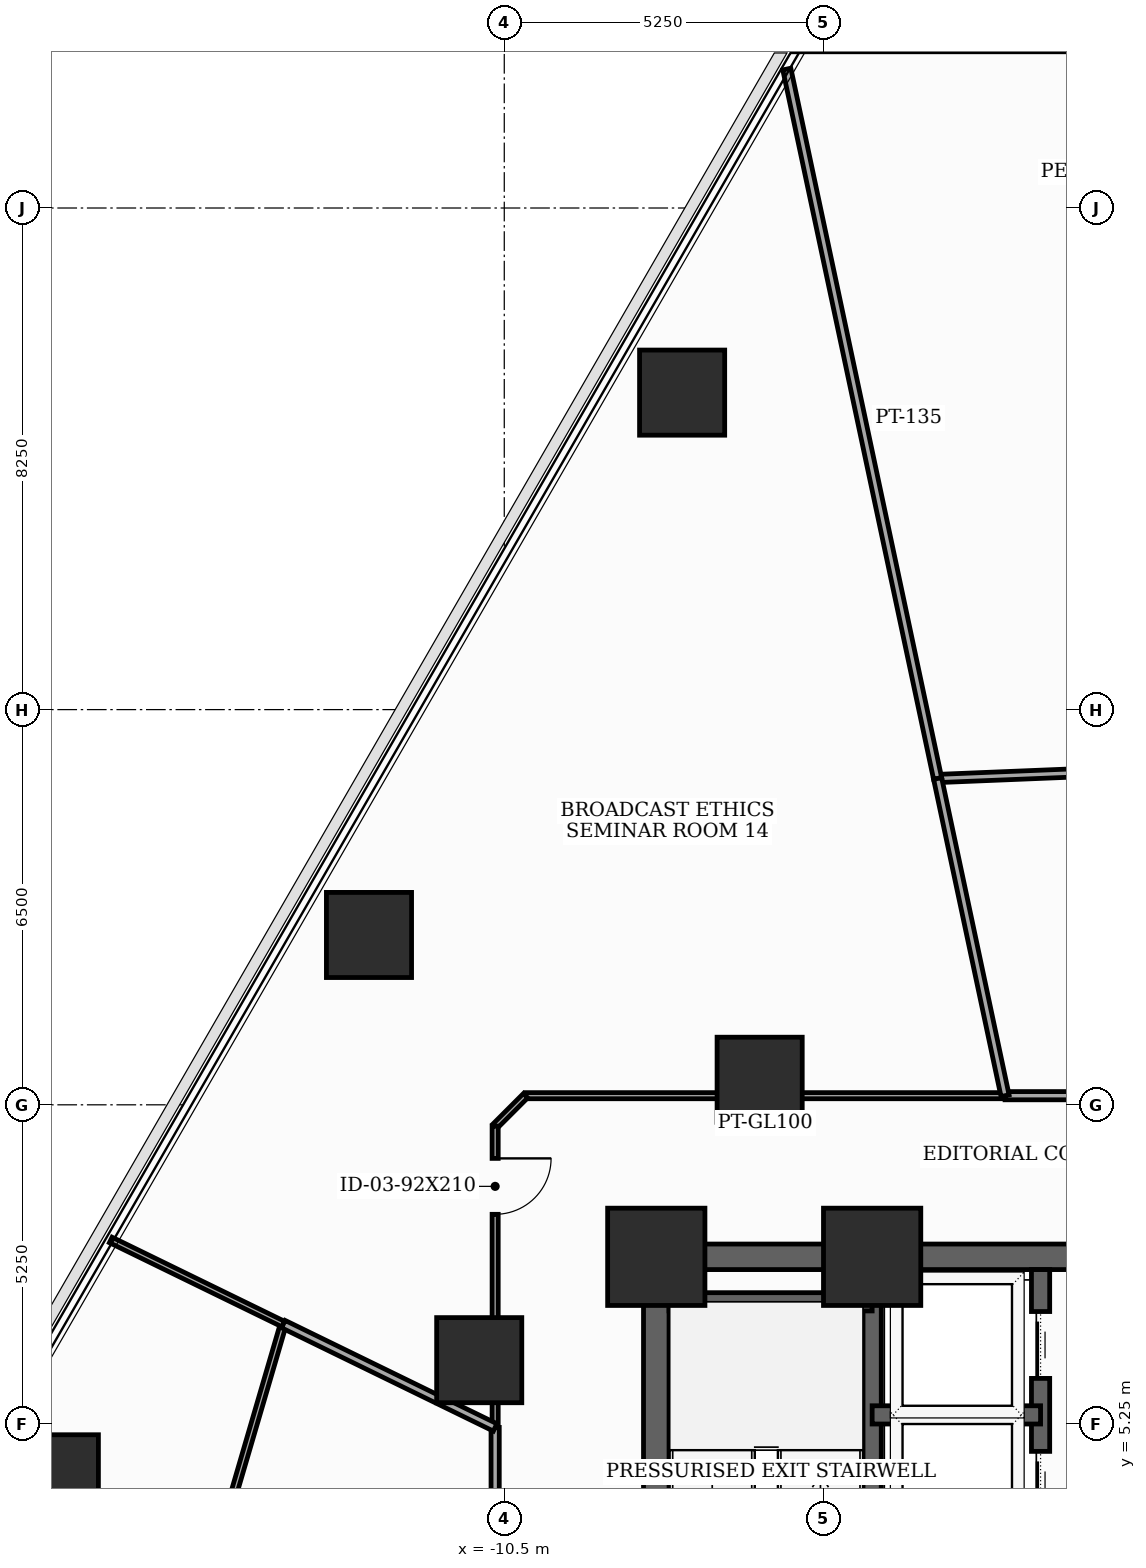
"""IFC4 building model, lengths in metres.
Left out: names, types, materials, properties, quantities, classifications, styles, units other than length and angle.
Written with IfcOpenShell. Run it as: python <this file> out.ifc"""

import sys

from ifc_helpers import new_model, si_unit, direction, frame, frame_2d, origin, origin_2d, place, context, subcontext, project, spatial, rectangle, extrude, element, fill, save


model = new_model("IFC4")
c1 = context("Model", 3, precision=1e-05, world=origin(), true_north=direction((0.0, 1.0)))
c2 = subcontext(c1, "Body", "Model", "MODEL_VIEW")
j1 = project(units=[si_unit("LENGTHUNIT", "METRE"), si_unit("PLANEANGLEUNIT", "RADIAN")], contexts=[c1])
p1 = place(None, origin())
s1 = spatial("IfcSite", under=j1, at=p1, CompositionType="ELEMENT")
p2 = place(p1, origin())
s2 = spatial("IfcBuilding", under=s1, at=p2, CompositionType="ELEMENT")
p3 = place(p2, frame((0.0, 0.0, 48.2)))
s3 = spatial("IfcBuildingStorey", under=s2, at=p3, CompositionType="ELEMENT", Elevation=48.2)
for number, where, z_axis, x_axis in (
    (1, (-4.45, 8.0, 0.0), (0.0, 0.0, 1.0), (1.0, 0.0, 0.0)),
    (2, (-8.0, 8.0, 0.0), (0.0, 0.0, 1.0), (1.0, 0.0, 0.0)),
):
    element("IfcColumn", number, at=place(p3, frame(where, z_axis=z_axis, x_axis=x_axis)), inside=s3, PredefinedType="COLUMN", context=c2, shape_type="SweptSolid", body=[
        extrude(rectangle(XDim=1.6, YDim=1.6, at=origin_2d()), origin(), (0.0, 0.0, 1.0), 3.7),
    ])
for number, where, z_axis, x_axis in (
    (3, (-6.3, 10.912, 0.0), (0.0, 0.0, 1.0), (1.0, 0.0, 0.0)),
    (4, (-10.912, 6.3, 0.0), (0.0, 0.0, 1.0), (1.0, 0.0, 0.0)),
    (5, (-7.575, 22.213, 0.0), (0.0, 0.0, 1.0), (1.0, 0.0, 0.0)),
    (6, (-12.725, 13.293, 0.0), (0.0, 0.0, 1.0), (1.0, 0.0, 0.0)),
    (7, (-17.875, 4.373, 0.0), (0.0, 0.0, 1.0), (1.0, 0.0, 0.0)),
):
    element("IfcColumn", number, at=place(p3, frame(where, z_axis=z_axis, x_axis=x_axis)), inside=s3, PredefinedType="COLUMN", context=c2, shape_type="SweptSolid", body=[
        extrude(rectangle(XDim=1.4, YDim=1.4, at=origin_2d()), origin(), (0.0, 0.0, 1.0), 3.7),
    ])
p4 = place(p3, frame((-8.0, -8.0, 0.0), z_axis=(0.0, 0.0, 1.0), x_axis=(0.0, 1.0, 0.0)))
e8 = element("IfcWall", 8, at=p4, inside=s3, PredefinedType="SHEAR", context=c2, shape_type="SweptSolid", body=[
    extrude(rectangle(XDim=16.0, YDim=0.42, at=frame_2d((8.0, 0.0))), origin(), (0.0, 0.0, 1.0), 3.5),
])
p5 = place(p4, frame((1.002, 0.0, 0.0)))
e9 = element("IfcOpeningElement", 9, at=p5, cuts=e8, PredefinedType="OPENING", context=c2, shape_type="SweptSolid", body=[
    extrude(rectangle(XDim=0.85, YDim=2.02, at=frame_2d((0.425, 1.01))), frame((0.0, 0.22, 0.0), z_axis=(0.0, -1.0, 0.0), x_axis=(1.0, 0.0, 0.0)), (0.0, 0.0, 1.0), 0.44),
])
p6 = place(p4, frame((5.35, 0.0, 0.0)))
e10 = element("IfcOpeningElement", 10, at=p6, cuts=e8, PredefinedType="OPENING", context=c2, shape_type="SweptSolid", body=[
    extrude(rectangle(XDim=1.05, YDim=2.15, at=frame_2d((0.525, 1.075))), frame((0.0, 0.22, 0.0), z_axis=(0.0, -1.0, 0.0), x_axis=(1.0, 0.0, 0.0)), (0.0, 0.0, 1.0), 0.44),
])
p7 = place(p3, frame((-8.0, 8.0, 0.0), z_axis=(0.0, 0.0, 1.0), x_axis=(1.0, 0.0, 0.0)))
e11 = element("IfcWall", 11, at=p7, inside=s3, PredefinedType="SHEAR", context=c2, shape_type="SweptSolid", body=[
    extrude(rectangle(XDim=16.0, YDim=0.42, at=frame_2d((8.0, 0.0))), origin(), (0.0, 0.0, 1.0), 3.5),
])
p8 = place(p7, frame((7.1, 0.0, 0.0)))
e12 = element("IfcOpeningElement", 12, at=p8, cuts=e11, PredefinedType="OPENING", context=c2, shape_type="SweptSolid", body=[
    extrude(rectangle(XDim=1.8, YDim=2.15, at=frame_2d((0.9, 1.075))), frame((0.0, 0.22, 0.0), z_axis=(0.0, -1.0, 0.0), x_axis=(1.0, 0.0, 0.0)), (0.0, 0.0, 1.0), 0.44),
])
p9 = place(p3, frame((-4.45, -7.79, 0.0), z_axis=(0.0, 0.0, 1.0), x_axis=(0.0, 1.0, 0.0)))
e13 = element("IfcWall", 13, at=p9, inside=s3, PredefinedType="SHEAR", context=c2, shape_type="SweptSolid", body=[
    extrude(rectangle(XDim=15.58, YDim=0.3, at=frame_2d((7.79, 0.0))), origin(), (0.0, 0.0, 1.0), 3.5),
])
p10 = place(p3, frame((-7.79, 7.26, 0.0), z_axis=(0.0, 0.0, 1.0), x_axis=(1.0, 0.0, 0.0)))
e14 = element("IfcWall", 14, at=p10, inside=s3, PredefinedType="SHEAR", context=c2, shape_type="SweptSolid", body=[
    extrude(rectangle(XDim=3.34, YDim=0.3, at=frame_2d((1.67, 0.0))), origin(), (0.0, 0.0, 1.0), 3.5),
])
p11 = place(p3, frame((-1.68, -4.85, 0.0), z_axis=(0.0, 0.0, 1.0), x_axis=(0.0, 1.0, 0.0)))
e15 = element("IfcWall", 15, at=p11, inside=s3, PredefinedType="SHEAR", context=c2, shape_type="SweptSolid", body=[
    extrude(rectangle(XDim=12.64, YDim=0.3, at=frame_2d((6.32, 0.0))), origin(), (0.0, 0.0, 1.0), 3.5),
])
p12 = place(p11, frame((3.95, 0.0, 0.0)))
e16 = element("IfcOpeningElement", 16, at=p12, cuts=e15, PredefinedType="OPENING", context=c2, shape_type="SweptSolid", body=[
    extrude(rectangle(XDim=1.1, YDim=2.1, at=frame_2d((0.55, 1.05))), frame((0.0, 0.16, 0.0), z_axis=(0.0, -1.0, 0.0), x_axis=(1.0, 0.0, 0.0)), (0.0, 0.0, 1.0), 0.32),
])
p13 = place(p11, frame((6.25, 0.0, 0.0)))
e17 = element("IfcOpeningElement", 17, at=p13, cuts=e15, PredefinedType="OPENING", context=c2, shape_type="SweptSolid", body=[
    extrude(rectangle(XDim=1.1, YDim=2.1, at=frame_2d((0.55, 1.05))), frame((0.0, 0.16, 0.0), z_axis=(0.0, -1.0, 0.0), x_axis=(1.0, 0.0, 0.0)), (0.0, 0.0, 1.0), 0.32),
])
p14 = place(p11, frame((8.55, 0.0, 0.0)))
e18 = element("IfcOpeningElement", 18, at=p14, cuts=e15, PredefinedType="OPENING", context=c2, shape_type="SweptSolid", body=[
    extrude(rectangle(XDim=1.1, YDim=2.1, at=frame_2d((0.55, 1.05))), frame((0.0, 0.16, 0.0), z_axis=(0.0, -1.0, 0.0), x_axis=(1.0, 0.0, 0.0)), (0.0, 0.0, 1.0), 0.32),
])
p15 = place(p11, frame((10.85, 0.0, 0.0)))
e19 = element("IfcOpeningElement", 19, at=p15, cuts=e15, PredefinedType="OPENING", context=c2, shape_type="SweptSolid", body=[
    extrude(rectangle(XDim=1.1, YDim=2.1, at=frame_2d((0.55, 1.05))), frame((0.0, 0.16, 0.0), z_axis=(0.0, -1.0, 0.0), x_axis=(1.0, 0.0, 0.0)), (0.0, 0.0, 1.0), 0.32),
])
p16 = place(p11, frame((0.45, 0.0, 0.0)))
e20 = element("IfcOpeningElement", 20, at=p16, cuts=e15, PredefinedType="OPENING", context=c2, shape_type="SweptSolid", body=[
    extrude(rectangle(XDim=0.85, YDim=2.02, at=frame_2d((0.425, 1.01))), frame((0.0, 0.16, 0.0), z_axis=(0.0, -1.0, 0.0), x_axis=(1.0, 0.0, 0.0)), (0.0, 0.0, 1.0), 0.32),
])
p17 = place(p11, frame((2.05, 0.0, 0.0)))
e21 = element("IfcOpeningElement", 21, at=p17, cuts=e15, PredefinedType="OPENING", context=c2, shape_type="SweptSolid", body=[
    extrude(rectangle(XDim=0.85, YDim=2.02, at=frame_2d((0.425, 1.01))), frame((0.0, 0.16, 0.0), z_axis=(0.0, -1.0, 0.0), x_axis=(1.0, 0.0, 0.0)), (0.0, 0.0, 1.0), 0.32),
])
p18 = place(p3, frame((-4.45, 5.4, 0.0), z_axis=(0.0, 0.0, 1.0), x_axis=(1.0, 0.0, 0.0)))
e22 = element("IfcWall", 22, at=p18, inside=s3, PredefinedType="SHEAR", context=c2, shape_type="SweptSolid", body=[
    extrude(rectangle(XDim=2.77, YDim=0.3, at=frame_2d((1.385, 0.0))), origin(), (0.0, 0.0, 1.0), 3.5),
])
p19 = place(p3, frame((1.715, 10.65, 0.0), z_axis=(0.0, 0.0, 1.0), x_axis=(-1.0, 0.0, 0.0)))
e23 = element("IfcWall", 23, at=p19, inside=s3, PredefinedType="PARTITIONING", context=c2, shape_type="SweptSolid", body=[
    extrude(rectangle(XDim=3.979, YDim=0.135, at=frame_2d((1.99, 0.0))), origin(), (0.0, 0.0, 1.0), 2.785),
])
p20 = place(p3, frame((-10.65, 5.194, 0.0), z_axis=(0.0, 0.0, 1.0), x_axis=(0.0, -1.0, 0.0)))
e24 = element("IfcWall", 24, at=p20, inside=s3, PredefinedType="PARTITIONING", context=c2, shape_type="SweptSolid", body=[
    extrude(rectangle(XDim=6.909, YDim=0.135, at=frame_2d((3.455, 0.0))), origin(), (0.0, 0.0, 1.0), 2.785),
])
p21 = place(p20, frame((2.979, 0.0, 0.0)))
e25 = element("IfcOpeningElement", 25, at=p21, cuts=e24, PredefinedType="OPENING", context=c2, shape_type="SweptSolid", body=[
    extrude(rectangle(XDim=0.95, YDim=2.1, at=frame_2d((0.475, 1.05))), frame((0.0, 0.077, 0.0), z_axis=(0.0, -1.0, 0.0), x_axis=(1.0, 0.0, 0.0)), (0.0, 0.0, 1.0), 0.155),
])
p22 = place(p3, frame((-2.264, 10.65, 0.0), z_axis=(0.0, 0.0, 1.0), x_axis=(-1.0, 0.0, 0.0)))
e26 = element("IfcWall", 26, at=p22, inside=s3, PredefinedType="MOVABLE", context=c2, shape_type="SweptSolid", body=[
    extrude(rectangle(XDim=7.886, YDim=0.1, at=frame_2d((3.943, 0.0))), origin(), (0.0, 0.0, 1.0), 2.685),
])
p23 = place(p3, frame((-10.15, 10.65, 0.0), z_axis=(0.0, 0.0, 1.0), x_axis=(-0.707106781187, -0.707106781187, 0.0)))
e27 = element("IfcWall", 27, at=p23, inside=s3, PredefinedType="MOVABLE", context=c2, shape_type="SweptSolid", body=[
    extrude(rectangle(XDim=0.707, YDim=0.1, at=frame_2d((0.354, 0.0))), origin(), (0.0, 0.0, 1.0), 3.5),
])
p24 = place(p3, frame((-10.65, 10.15, 0.0), z_axis=(0.0, 0.0, 1.0), x_axis=(0.0, -1.0, 0.0)))
e28 = element("IfcWall", 28, at=p24, inside=s3, PredefinedType="MOVABLE", context=c2, shape_type="SweptSolid", body=[
    extrude(rectangle(XDim=4.956, YDim=0.1, at=frame_2d((2.478, 0.0))), origin(), (0.0, 0.0, 1.0), 2.785),
])
p25 = place(p24, frame((0.531, 0.0, 0.0)))
e29 = element("IfcOpeningElement", 29, at=p25, cuts=e28, PredefinedType="OPENING", context=c2, shape_type="SweptSolid", body=[
    extrude(rectangle(XDim=0.92, YDim=2.1, at=frame_2d((0.46, 1.05))), frame((0.0, 0.06, 0.0), z_axis=(0.0, -1.0, 0.0), x_axis=(1.0, 0.0, 0.0)), (0.0, 0.0, 1.0), 0.12),
])
p26 = place(p3, frame((-3.373, 15.867, 0.0), z_axis=(0.0, 0.0, 1.0), x_axis=(0.999166982533, 0.040808589988, 0.0)))
e30 = element("IfcWall", 30, at=p26, inside=s3, PredefinedType="PARTITIONING", context=c2, shape_type="SweptSolid", body=[
    extrude(rectangle(XDim=5.881, YDim=0.135, at=frame_2d((2.94, 0.0))), origin(), (0.0, 0.0, 1.0), 3.5),
])
p27 = place(p3, frame((-5.854, 27.535, 0.0), z_axis=(0.0, 0.0, 1.0), x_axis=(0.207936838286, -0.978142255137, 0.0)))
e31 = element("IfcWall", 31, at=p27, inside=s3, PredefinedType="PARTITIONING", context=c2, shape_type="SweptSolid", body=[
    extrude(rectangle(XDim=11.929, YDim=0.135, at=frame_2d((5.964, 0.0))), origin(), (0.0, 0.0, 1.0), 2.935),
])
p28 = place(p3, frame((-3.373, 15.867, 0.0), z_axis=(0.0, 0.0, 1.0), x_axis=(0.20795017925, -0.978139418974, 0.0)))
e32 = element("IfcWall", 32, at=p28, inside=s3, PredefinedType="PARTITIONING", context=c2, shape_type="SweptSolid", body=[
    extrude(rectangle(XDim=5.334, YDim=0.135, at=frame_2d((2.667, 0.0))), origin(), (0.0, 0.0, 1.0), 2.785),
])
p29 = place(p3, frame((-15.736, 1.423, 0.0), z_axis=(0.0, 0.0, 1.0), x_axis=(0.281231672123, 0.959639904649, 0.0)))
e33 = element("IfcWall", 33, at=p29, inside=s3, PredefinedType="MOVABLE", context=c2, shape_type="SweptSolid", body=[
    extrude(rectangle(XDim=5.7, YDim=0.1, at=frame_2d((2.85, 0.0))), origin(), (0.0, 0.0, 1.0), 2.685),
])
p30 = place(p3, frame((-14.133, 6.893, 0.0), z_axis=(0.0, 0.0, 1.0), x_axis=(-0.898789989557, 0.438379464245, 0.0)))
e34 = element("IfcWall", 34, at=p30, inside=s3, PredefinedType="MOVABLE", context=c2, shape_type="SweptSolid", body=[
    extrude(rectangle(XDim=3.158, YDim=0.1, at=frame_2d((1.579, 0.0))), origin(), (0.0, 0.0, 1.0), 2.935),
])
p31 = place(p3, frame((-10.65, 5.194, 0.0), z_axis=(0.0, 0.0, 1.0), x_axis=(-0.898781159743, 0.438397567159, 0.0)))
e35 = element("IfcWall", 35, at=p31, inside=s3, PredefinedType="PARTITIONING", context=c2, shape_type="SweptSolid", body=[
    extrude(rectangle(XDim=3.875, YDim=0.135, at=frame_2d((1.938, 0.0))), origin(), (0.0, 0.0, 1.0), 2.785),
])
p32 = place(p14, origin())
e36 = element("IfcDoor", 36, at=p32, inside=s3, OperationType="SLIDING_TO_LEFT", PredefinedType="DOOR", context=c2, shape_type="SweptSolid", body=[
    extrude(rectangle(XDim=1.1, YDim=2.1, at=frame_2d((0.55, 1.05))), frame((0.0, 0.025, 0.0), z_axis=(0.0, -1.0, 0.0), x_axis=(1.0, 0.0, 0.0)), (0.0, 0.0, 1.0), 0.05),
])
fill(e18, e36)
p33 = place(p15, origin())
e37 = element("IfcDoor", 37, at=p33, inside=s3, OperationType="SLIDING_TO_LEFT", PredefinedType="DOOR", context=c2, shape_type="SweptSolid", body=[
    extrude(rectangle(XDim=1.1, YDim=2.1, at=frame_2d((0.55, 1.05))), frame((0.0, 0.025, 0.0), z_axis=(0.0, -1.0, 0.0), x_axis=(1.0, 0.0, 0.0)), (0.0, 0.0, 1.0), 0.05),
])
fill(e19, e37)
p34 = place(p25, origin())
e38 = element("IfcDoor", 38, at=p34, inside=s3, OperationType="SINGLE_SWING_LEFT", PredefinedType="DOOR", context=c2, shape_type="SweptSolid", body=[
    extrude(rectangle(XDim=0.92, YDim=2.1, at=frame_2d((0.46, 1.05))), frame((0.0, 0.025, 0.0), z_axis=(0.0, -1.0, 0.0), x_axis=(1.0, 0.0, 0.0)), (0.0, 0.0, 1.0), 0.05),
])
fill(e29, e38)
save(model, sys.argv[1])
